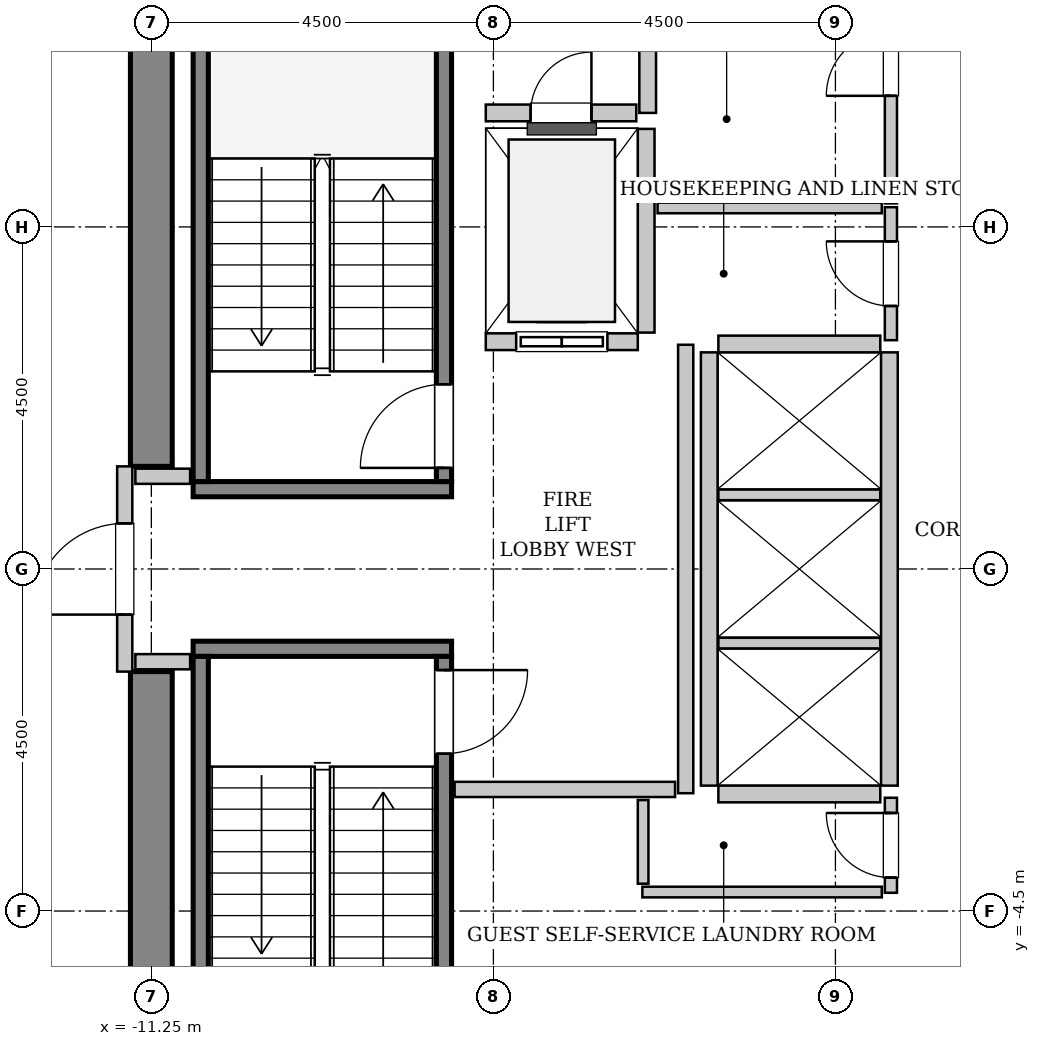
"""IFC4 building model, lengths in metres.
Left out: names, types, materials, properties, quantities, classifications, styles, units other than length and angle.
Written with IfcOpenShell. Run it as: python <this file> out.ifc"""

import sys

from ifc_helpers import new_model, si_unit, direction, frame, frame_2d, origin, place, context, subcontext, project, spatial, rectangle, extrude, source, transform, mapped, element, fill, save


model = new_model("IFC4")
c1 = context("Model", 3, precision=1e-05, world=origin(), true_north=direction((0.0, 1.0)))
c2 = subcontext(c1, "Body", "Model", "MODEL_VIEW")
j1 = project(units=[si_unit("LENGTHUNIT", "METRE"), si_unit("PLANEANGLEUNIT", "RADIAN")], contexts=[c1])
p1 = place(None, origin())
s1 = spatial("IfcSite", under=j1, at=p1, CompositionType="ELEMENT")
p2 = place(p1, origin())
s2 = spatial("IfcBuilding", under=s1, at=p2, CompositionType="ELEMENT")
p3 = place(p2, frame((0.0, 0.0, 198.2)))
s3 = spatial("IfcBuildingStorey", under=s2, at=p3, CompositionType="ELEMENT", Elevation=198.2)
m1 = source(origin(), c2, "Body", "SweptSolid", [
    extrude(rectangle(XDim=7.375, YDim=0.55, at=frame_2d((3.688, 0.0))), origin(), (0.0, 0.0, 1.0), 3.8),
])
for number, where, z_axis, x_axis in (
    (1, (-11.25, -8.725, 0.0), (0.0, 0.0, 1.0), (0.0, 1.0, 0.0)),
    (2, (-11.25, 1.35, 0.0), (0.0, 0.0, 1.0), (0.0, 1.0, 0.0)),
):
    element("IfcWall", number, at=place(p3, frame(where, z_axis=z_axis, x_axis=x_axis)), inside=s3, PredefinedType="SHEAR", context=c2, shape_type="MappedRepresentation", body=[
        mapped(m1, transform((0.0, 0.0, 0.0), x_axis=(1.0, 0.0, 0.0), y_axis=(0.0, 1.0, 0.0), z_axis=(0.0, 0.0, 1.0), scale=1.0)),
    ])
m2 = source(origin(), c2, "Body", "SweptSolid", [
    extrude(rectangle(XDim=3.4, YDim=0.2, at=frame_2d((1.7, 0.0))), origin(), (0.0, 0.0, 1.0), 3.8),
])
p4 = place(p3, frame((-7.3, 1.05, 0.0), z_axis=(0.0, 0.0, 1.0), x_axis=(-1.0, 0.0, 0.0)))
e3 = element("IfcWall", 3, at=p4, inside=s3, PredefinedType="SOLIDWALL", context=c2, shape_type="MappedRepresentation", body=[
    mapped(m2, transform((0.0, 0.0, 0.0), x_axis=(1.0, 0.0, 0.0), y_axis=(0.0, 1.0, 0.0), z_axis=(0.0, 0.0, 1.0), scale=1.0)),
])
m3 = source(origin(), c2, "Body", "SweptSolid", [
    extrude(rectangle(XDim=7.1, YDim=0.2, at=frame_2d((3.55, 0.0))), origin(), (0.0, 0.0, 1.0), 3.8),
])
p5 = place(p3, frame((-7.4, 1.15, 0.0), z_axis=(0.0, 0.0, 1.0), x_axis=(0.0, 1.0, 0.0)))
e4 = element("IfcWall", 4, at=p5, inside=s3, PredefinedType="SOLIDWALL", context=c2, shape_type="MappedRepresentation", body=[
    mapped(m3, transform((0.0, 0.0, 0.0), x_axis=(1.0, 0.0, 0.0), y_axis=(0.0, 1.0, 0.0), z_axis=(0.0, 0.0, 1.0), scale=1.0)),
])
p6 = place(p5, frame((0.18, 0.0, 0.0)))
e5 = element("IfcOpeningElement", 5, at=p6, cuts=e4, PredefinedType="OPENING", context=c2, shape_type="SweptSolid", body=[
    extrude(rectangle(XDim=1.1, YDim=2.15, at=frame_2d((0.55, 1.075))), frame((0.0, 0.11, 0.0), z_axis=(0.0, -1.0, 0.0), x_axis=(1.0, 0.0, 0.0)), (0.0, 0.0, 1.0), 0.22),
])
p7 = place(p3, frame((-10.6, 1.15, 0.0), z_axis=(0.0, 0.0, 1.0), x_axis=(0.0, 1.0, 0.0)))
e6 = element("IfcWall", 6, at=p7, inside=s3, PredefinedType="SOLIDWALL", context=c2, shape_type="MappedRepresentation", body=[
    mapped(m3, transform((0.0, 0.0, 0.0), x_axis=(1.0, 0.0, 0.0), y_axis=(0.0, 1.0, 0.0), z_axis=(0.0, 0.0, 1.0), scale=1.0)),
])
p8 = place(p3, frame((-10.7, -1.05, 0.0), z_axis=(0.0, 0.0, 1.0), x_axis=(1.0, 0.0, 0.0)))
e7 = element("IfcWall", 7, at=p8, inside=s3, PredefinedType="SOLIDWALL", context=c2, shape_type="MappedRepresentation", body=[
    mapped(m2, transform((0.0, 0.0, 0.0), x_axis=(1.0, 0.0, 0.0), y_axis=(0.0, 1.0, 0.0), z_axis=(0.0, 0.0, 1.0), scale=1.0)),
])
p9 = place(p3, frame((-10.6, -1.15, 0.0), z_axis=(0.0, 0.0, 1.0), x_axis=(0.0, -1.0, 0.0)))
e8 = element("IfcWall", 8, at=p9, inside=s3, PredefinedType="SOLIDWALL", context=c2, shape_type="MappedRepresentation", body=[
    mapped(m3, transform((0.0, 0.0, 0.0), x_axis=(1.0, 0.0, 0.0), y_axis=(0.0, 1.0, 0.0), z_axis=(0.0, 0.0, 1.0), scale=1.0)),
])
p10 = place(p3, frame((-7.4, -1.15, 0.0), z_axis=(0.0, 0.0, 1.0), x_axis=(0.0, -1.0, 0.0)))
e9 = element("IfcWall", 9, at=p10, inside=s3, PredefinedType="SOLIDWALL", context=c2, shape_type="MappedRepresentation", body=[
    mapped(m3, transform((0.0, 0.0, 0.0), x_axis=(1.0, 0.0, 0.0), y_axis=(0.0, 1.0, 0.0), z_axis=(0.0, 0.0, 1.0), scale=1.0)),
])
p11 = place(p10, frame((0.18, 0.0, 0.0)))
e10 = element("IfcOpeningElement", 10, at=p11, cuts=e9, PredefinedType="OPENING", context=c2, shape_type="SweptSolid", body=[
    extrude(rectangle(XDim=1.1, YDim=2.15, at=frame_2d((0.55, 1.075))), frame((0.0, 0.11, 0.0), z_axis=(0.0, -1.0, 0.0), x_axis=(1.0, 0.0, 0.0)), (0.0, 0.0, 1.0), 0.22),
])
m4 = source(origin(), c2, "Body", "SweptSolid", [
    extrude(rectangle(XDim=2.0, YDim=0.22, at=frame_2d((1.0, 0.0))), origin(), (0.0, 0.0, 1.0), 3.485),
])
p12 = place(p3, frame((-6.85, 2.99, 0.0), z_axis=(0.0, 0.0, 1.0), x_axis=(1.0, 0.0, 0.0)))
e11 = element("IfcWall", 11, at=p12, inside=s3, PredefinedType="SOLIDWALL", context=c2, shape_type="MappedRepresentation", body=[
    mapped(m4, transform((0.0, 0.0, 0.0), x_axis=(1.0, 0.0, 0.0), y_axis=(0.0, 1.0, 0.0), z_axis=(0.0, 0.0, 1.0), scale=1.0)),
])
p13 = place(p12, frame((0.4, 0.0, 0.0)))
e12 = element("IfcOpeningElement", 12, at=p13, cuts=e11, PredefinedType="OPENING", context=c2, shape_type="SweptSolid", body=[
    extrude(rectangle(XDim=1.2, YDim=2.2, at=frame_2d((0.6, 1.1))), frame((0.0, 0.12, 0.0), z_axis=(0.0, -1.0, 0.0), x_axis=(1.0, 0.0, 0.0)), (0.0, 0.0, 1.0), 0.24),
])
m5 = source(origin(), c2, "Body", "SweptSolid", [
    extrude(rectangle(XDim=2.68, YDim=0.22, at=frame_2d((1.34, 0.0))), origin(), (0.0, 0.0, 1.0), 3.485),
])
p14 = place(p3, frame((-4.74, 3.11, 0.0), z_axis=(0.0, 0.0, 1.0), x_axis=(0.0, 1.0, 0.0)))
e13 = element("IfcWall", 13, at=p14, inside=s3, PredefinedType="SOLIDWALL", context=c2, shape_type="MappedRepresentation", body=[
    mapped(m5, transform((0.0, 0.0, 0.0), x_axis=(1.0, 0.0, 0.0), y_axis=(0.0, 1.0, 0.0), z_axis=(0.0, 0.0, 1.0), scale=1.0)),
])
m6 = source(origin(), c2, "Body", "SweptSolid", [
    extrude(rectangle(XDim=5.7, YDim=0.22, at=frame_2d((2.85, 0.0))), origin(), (0.0, 0.0, 1.0), 3.485),
])
for number, where, z_axis, x_axis in (
    (14, (-1.54, -2.85, 0.0), (0.0, 0.0, 1.0), (0.0, 1.0, 0.0)),
    (15, (-3.91, 2.85, 0.0), (0.0, 0.0, 1.0), (0.0, -1.0, 0.0)),
):
    element("IfcWall", number, at=place(p3, frame(where, z_axis=z_axis, x_axis=x_axis)), inside=s3, PredefinedType="SOLIDWALL", context=c2, shape_type="MappedRepresentation", body=[
        mapped(m6, transform((0.0, 0.0, 0.0), x_axis=(1.0, 0.0, 0.0), y_axis=(0.0, 1.0, 0.0), z_axis=(0.0, 0.0, 1.0), scale=1.0)),
    ])
m7 = source(origin(), c2, "Body", "SweptSolid", [
    extrude(rectangle(XDim=2.13, YDim=0.22, at=frame_2d((1.065, 0.0))), origin(), (0.0, 0.0, 1.0), 3.485),
])
p15 = place(p3, frame((-3.79, -2.96, 0.0), z_axis=(0.0, 0.0, 1.0), x_axis=(1.0, 0.0, 0.0)))
e16 = element("IfcWall", 16, at=p15, inside=s3, PredefinedType="SOLIDWALL", context=c2, shape_type="MappedRepresentation", body=[
    mapped(m7, transform((0.0, 0.0, 0.0), x_axis=(1.0, 0.0, 0.0), y_axis=(0.0, 1.0, 0.0), z_axis=(0.0, 0.0, 1.0), scale=1.0)),
])
m8 = source(origin(), c2, "Body", "SweptSolid", [
    extrude(rectangle(XDim=2.13, YDim=0.14, at=frame_2d((1.065, 0.0))), origin(), (0.0, 0.0, 1.0), 3.485),
])
for number, where, z_axis, x_axis in (
    (17, (-3.79, -0.975, 0.0), (0.0, 0.0, 1.0), (1.0, 0.0, 0.0)),
    (18, (-3.79, 0.975, 0.0), (0.0, 0.0, 1.0), (1.0, 0.0, 0.0)),
):
    element("IfcWall", number, at=place(p3, frame(where, z_axis=z_axis, x_axis=x_axis)), inside=s3, PredefinedType="PARTITIONING", context=c2, shape_type="MappedRepresentation", body=[
        mapped(m8, transform((0.0, 0.0, 0.0), x_axis=(1.0, 0.0, 0.0), y_axis=(0.0, 1.0, 0.0), z_axis=(0.0, 0.0, 1.0), scale=1.0)),
    ])
p16 = place(p3, frame((-1.66, 2.96, 0.0), z_axis=(0.0, 0.0, 1.0), x_axis=(-1.0, 0.0, 0.0)))
e19 = element("IfcWall", 19, at=p16, inside=s3, PredefinedType="SOLIDWALL", context=c2, shape_type="MappedRepresentation", body=[
    mapped(m7, transform((0.0, 0.0, 0.0), x_axis=(1.0, 0.0, 0.0), y_axis=(0.0, 1.0, 0.0), z_axis=(0.0, 0.0, 1.0), scale=1.0)),
])
m9 = source(origin(), c2, "Body", "SweptSolid", [
    extrude(rectangle(XDim=2.25, YDim=0.22, at=frame_2d((1.125, 0.0))), origin(), (0.0, 0.0, 1.0), 3.485),
])
p17 = place(p3, frame((-4.72, 6.0, 0.0), z_axis=(0.0, 0.0, 1.0), x_axis=(0.0, 1.0, 0.0)))
e20 = element("IfcWall", 20, at=p17, inside=s3, PredefinedType="SOLIDWALL", context=c2, shape_type="MappedRepresentation", body=[
    mapped(m9, transform((0.0, 0.0, 0.0), x_axis=(1.0, 0.0, 0.0), y_axis=(0.0, 1.0, 0.0), z_axis=(0.0, 0.0, 1.0), scale=1.0)),
])
m10 = source(origin(), c2, "Body", "SweptSolid", [
    extrude(rectangle(XDim=1.98, YDim=0.22, at=frame_2d((0.99, 0.0))), origin(), (0.0, 0.0, 1.0), 3.485),
])
p18 = place(p3, frame((-6.85, 6.0, 0.0), z_axis=(0.0, 0.0, 1.0), x_axis=(1.0, 0.0, 0.0)))
e21 = element("IfcWall", 21, at=p18, inside=s3, PredefinedType="SOLIDWALL", context=c2, shape_type="MappedRepresentation", body=[
    mapped(m10, transform((0.0, 0.0, 0.0), x_axis=(1.0, 0.0, 0.0), y_axis=(0.0, 1.0, 0.0), z_axis=(0.0, 0.0, 1.0), scale=1.0)),
])
p19 = place(p18, frame((0.59, 0.0, 0.0)))
e22 = element("IfcOpeningElement", 22, at=p19, cuts=e21, PredefinedType="OPENING", context=c2, shape_type="SweptSolid", body=[
    extrude(rectangle(XDim=0.8, YDim=2.0, at=frame_2d((0.4, 1.0))), frame((0.0, 0.12, 0.0), z_axis=(0.0, -1.0, 0.0), x_axis=(1.0, 0.0, 0.0)), (0.0, 0.0, 1.0), 0.24),
])
m11 = source(origin(), c2, "Body", "SweptSolid", [
    extrude(rectangle(XDim=2.7, YDim=0.2, at=frame_2d((1.35, 0.0))), origin(), (0.0, 0.0, 1.0), 2.375),
])
p20 = place(p3, frame((-11.6, -1.35, 0.0), z_axis=(0.0, 0.0, 1.0), x_axis=(0.0, 1.0, 0.0)))
e23 = element("IfcWall", 23, at=p20, inside=s3, PredefinedType="PARTITIONING", context=c2, shape_type="MappedRepresentation", body=[
    mapped(m11, transform((0.0, 0.0, 0.0), x_axis=(1.0, 0.0, 0.0), y_axis=(0.0, 1.0, 0.0), z_axis=(0.0, 0.0, 1.0), scale=1.0)),
])
p21 = place(p20, frame((0.75, 0.0, 0.0)))
e24 = element("IfcOpeningElement", 24, at=p21, cuts=e23, PredefinedType="OPENING", context=c2, shape_type="SweptSolid", body=[
    extrude(rectangle(XDim=1.2, YDim=2.15, at=frame_2d((0.6, 1.075))), frame((0.0, 0.11, 0.0), z_axis=(0.0, -1.0, 0.0), x_axis=(1.0, 0.0, 0.0)), (0.0, 0.0, 1.0), 0.22),
])
m12 = source(origin(), c2, "Body", "SweptSolid", [
    extrude(rectangle(XDim=5.9, YDim=0.2, at=frame_2d((2.95, 0.0))), origin(), (0.0, 0.0, 1.0), 3.485),
])
p22 = place(p3, frame((-4.22, -2.95, 0.0), z_axis=(0.0, 0.0, 1.0), x_axis=(0.0, 1.0, 0.0)))
e25 = element("IfcWall", 25, at=p22, inside=s3, PredefinedType="PARTITIONING", context=c2, shape_type="MappedRepresentation", body=[
    mapped(m12, transform((0.0, 0.0, 0.0), x_axis=(1.0, 0.0, 0.0), y_axis=(0.0, 1.0, 0.0), z_axis=(0.0, 0.0, 1.0), scale=1.0)),
])
m13 = source(origin(), c2, "Body", "SweptSolid", [
    extrude(rectangle(XDim=2.9, YDim=0.2, at=frame_2d((1.45, 0.0))), origin(), (0.0, 0.0, 1.0), 3.485),
])
p23 = place(p3, frame((-7.26, -2.9, 0.0), z_axis=(0.0, 0.0, 1.0), x_axis=(1.0, 0.0, 0.0)))
e26 = element("IfcWall", 26, at=p23, inside=s3, PredefinedType="PARTITIONING", context=c2, shape_type="MappedRepresentation", body=[
    mapped(m13, transform((0.0, 0.0, 0.0), x_axis=(1.0, 0.0, 0.0), y_axis=(0.0, 1.0, 0.0), z_axis=(0.0, 0.0, 1.0), scale=1.0)),
])
m14 = source(origin(), c2, "Body", "SweptSolid", [
    extrude(rectangle(XDim=0.72, YDim=0.2, at=frame_2d((0.36, 0.0))), origin(), (0.0, 0.0, 1.0), 3.485),
])
for number, where, z_axis, x_axis in (
    (27, (-11.46, 1.22, 0.0), (0.0, 0.0, 1.0), (1.0, 0.0, 0.0)),
    (28, (-11.46, -1.22, 0.0), (0.0, 0.0, 1.0), (1.0, 0.0, 0.0)),
):
    element("IfcWall", number, at=place(p3, frame(where, z_axis=z_axis, x_axis=x_axis)), inside=s3, PredefinedType="PARTITIONING", context=c2, shape_type="MappedRepresentation", body=[
        mapped(m14, transform((0.0, 0.0, 0.0), x_axis=(1.0, 0.0, 0.0), y_axis=(0.0, 1.0, 0.0), z_axis=(0.0, 0.0, 1.0), scale=1.0)),
    ])
m15 = source(origin(), c2, "Body", "SweptSolid", [
    extrude(rectangle(XDim=1.75, YDim=0.16, at=frame_2d((0.875, 0.0))), origin(), (0.0, 0.0, 1.0), 3.485),
])
p24 = place(p3, frame((-1.52, 3.01, 0.0), z_axis=(0.0, 0.0, 1.0), x_axis=(0.0, 1.0, 0.0)))
e29 = element("IfcWall", 29, at=p24, inside=s3, PredefinedType="PARTITIONING", context=c2, shape_type="MappedRepresentation", body=[
    mapped(m15, transform((0.0, 0.0, 0.0), x_axis=(1.0, 0.0, 0.0), y_axis=(0.0, 1.0, 0.0), z_axis=(0.0, 0.0, 1.0), scale=1.0)),
])
p25 = place(p24, frame((0.45, 0.0, 0.0)))
e30 = element("IfcOpeningElement", 30, at=p25, cuts=e29, PredefinedType="OPENING", context=c2, shape_type="SweptSolid", body=[
    extrude(rectangle(XDim=0.85, YDim=2.1, at=frame_2d((0.425, 1.05))), frame((0.0, 0.09, 0.0), z_axis=(0.0, -1.0, 0.0), x_axis=(1.0, 0.0, 0.0)), (0.0, 0.0, 1.0), 0.18),
])
m16 = source(origin(), c2, "Body", "SweptSolid", [
    extrude(rectangle(XDim=2.95, YDim=0.14, at=frame_2d((1.475, 0.0))), origin(), (0.0, 0.0, 1.0), 3.485),
])
p26 = place(p3, frame((-4.59, 4.75, 0.0), z_axis=(0.0, 0.0, 1.0), x_axis=(1.0, 0.0, 0.0)))
e31 = element("IfcWall", 31, at=p26, inside=s3, PredefinedType="PARTITIONING", context=c2, shape_type="MappedRepresentation", body=[
    mapped(m16, transform((0.0, 0.0, 0.0), x_axis=(1.0, 0.0, 0.0), y_axis=(0.0, 1.0, 0.0), z_axis=(0.0, 0.0, 1.0), scale=1.0)),
])
m17 = source(origin(), c2, "Body", "SweptSolid", [
    extrude(rectangle(XDim=3.68, YDim=0.16, at=frame_2d((1.84, 0.0))), origin(), (0.0, 0.0, 1.0), 3.485),
])
p27 = place(p3, frame((-1.52, 4.81, 0.0), z_axis=(0.0, 0.0, 1.0), x_axis=(0.0, 1.0, 0.0)))
e32 = element("IfcWall", 32, at=p27, inside=s3, PredefinedType="PARTITIONING", context=c2, shape_type="MappedRepresentation", body=[
    mapped(m17, transform((0.0, 0.0, 0.0), x_axis=(1.0, 0.0, 0.0), y_axis=(0.0, 1.0, 0.0), z_axis=(0.0, 0.0, 1.0), scale=1.0)),
])
p28 = place(p27, frame((1.415, 0.0, 0.0)))
e33 = element("IfcOpeningElement", 33, at=p28, cuts=e32, PredefinedType="OPENING", context=c2, shape_type="SweptSolid", body=[
    extrude(rectangle(XDim=0.85, YDim=2.1, at=frame_2d((0.425, 1.05))), frame((0.0, 0.09, 0.0), z_axis=(0.0, -1.0, 0.0), x_axis=(1.0, 0.0, 0.0)), (0.0, 0.0, 1.0), 0.18),
])
m18 = source(origin(), c2, "Body", "SweptSolid", [
    extrude(rectangle(XDim=1.25, YDim=0.16, at=frame_2d((0.625, 0.0))), origin(), (0.0, 0.0, 1.0), 3.485),
])
p29 = place(p3, frame((-1.52, -4.26, 0.0), z_axis=(0.0, 0.0, 1.0), x_axis=(0.0, 1.0, 0.0)))
e34 = element("IfcWall", 34, at=p29, inside=s3, PredefinedType="PARTITIONING", context=c2, shape_type="MappedRepresentation", body=[
    mapped(m18, transform((0.0, 0.0, 0.0), x_axis=(1.0, 0.0, 0.0), y_axis=(0.0, 1.0, 0.0), z_axis=(0.0, 0.0, 1.0), scale=1.0)),
])
p30 = place(p29, frame((0.2, 0.0, 0.0)))
e35 = element("IfcOpeningElement", 35, at=p30, cuts=e34, PredefinedType="OPENING", context=c2, shape_type="SweptSolid", body=[
    extrude(rectangle(XDim=0.85, YDim=2.1, at=frame_2d((0.425, 1.05))), frame((0.0, 0.09, 0.0), z_axis=(0.0, -1.0, 0.0), x_axis=(1.0, 0.0, 0.0)), (0.0, 0.0, 1.0), 0.18),
])
m19 = source(origin(), c2, "Body", "SweptSolid", [
    extrude(rectangle(XDim=3.15, YDim=0.14, at=frame_2d((1.575, 0.0))), origin(), (0.0, 0.0, 1.0), 3.485),
])
p31 = place(p3, frame((-4.79, -4.25, 0.0), z_axis=(0.0, 0.0, 1.0), x_axis=(1.0, 0.0, 0.0)))
e36 = element("IfcWall", 36, at=p31, inside=s3, PredefinedType="PARTITIONING", context=c2, shape_type="MappedRepresentation", body=[
    mapped(m19, transform((0.0, 0.0, 0.0), x_axis=(1.0, 0.0, 0.0), y_axis=(0.0, 1.0, 0.0), z_axis=(0.0, 0.0, 1.0), scale=1.0)),
])
m20 = source(origin(), c2, "Body", "SweptSolid", [
    extrude(rectangle(XDim=1.1, YDim=0.14, at=frame_2d((0.55, 0.0))), origin(), (0.0, 0.0, 1.0), 3.485),
])
p32 = place(p3, frame((-4.78, -4.14, 0.0), z_axis=(0.0, 0.0, 1.0), x_axis=(0.0, 1.0, 0.0)))
e37 = element("IfcWall", 37, at=p32, inside=s3, PredefinedType="PARTITIONING", context=c2, shape_type="MappedRepresentation", body=[
    mapped(m20, transform((0.0, 0.0, 0.0), x_axis=(1.0, 0.0, 0.0), y_axis=(0.0, 1.0, 0.0), z_axis=(0.0, 0.0, 1.0), scale=1.0)),
])
m21 = source(origin(), c2, "Body", "SweptSolid", [
    extrude(rectangle(XDim=1.1, YDim=2.15, at=frame_2d((0.55, 1.075))), frame((0.0, 0.025, 0.0), z_axis=(0.0, -1.0, 0.0), x_axis=(1.0, 0.0, 0.0)), (0.0, 0.0, 1.0), 0.05),
])
p33 = place(p6, origin())
e38 = element("IfcDoor", 38, at=p33, inside=s3, OperationType="SINGLE_SWING_LEFT", PredefinedType="DOOR", context=c2, shape_type="MappedRepresentation", body=[
    mapped(m21, transform((0.0, 0.0, 0.0), x_axis=(1.0, 0.0, 0.0), y_axis=(0.0, 1.0, 0.0), z_axis=(0.0, 0.0, 1.0), scale=1.0)),
])
fill(e5, e38)
p34 = place(p11, origin())
e39 = element("IfcDoor", 39, at=p34, inside=s3, OperationType="SINGLE_SWING_LEFT", PredefinedType="DOOR", context=c2, shape_type="MappedRepresentation", body=[
    mapped(m21, transform((0.0, 0.0, 0.0), x_axis=(1.0, 0.0, 0.0), y_axis=(0.0, 1.0, 0.0), z_axis=(0.0, 0.0, 1.0), scale=1.0)),
])
fill(e10, e39)
m22 = source(origin(), c2, "Body", "SweptSolid", [
    extrude(rectangle(XDim=1.2, YDim=2.2, at=frame_2d((0.6, 1.1))), frame((0.0, 0.025, 0.0), z_axis=(0.0, -1.0, 0.0), x_axis=(1.0, 0.0, 0.0)), (0.0, 0.0, 1.0), 0.05),
])
p35 = place(p13, origin())
e40 = element("IfcDoor", 40, at=p35, inside=s3, OperationType="SLIDING_TO_LEFT", PredefinedType="DOOR", context=c2, shape_type="MappedRepresentation", body=[
    mapped(m22, transform((0.0, 0.0, 0.0), x_axis=(1.0, 0.0, 0.0), y_axis=(0.0, 1.0, 0.0), z_axis=(0.0, 0.0, 1.0), scale=1.0)),
])
fill(e12, e40)
m23 = source(origin(), c2, "Body", "SweptSolid", [
    extrude(rectangle(XDim=0.8, YDim=2.0, at=frame_2d((0.4, 1.0))), frame((0.0, 0.025, 0.0), z_axis=(0.0, -1.0, 0.0), x_axis=(1.0, 0.0, 0.0)), (0.0, 0.0, 1.0), 0.05),
])
p36 = place(p19, origin())
e41 = element("IfcDoor", 41, at=p36, inside=s3, OperationType="SINGLE_SWING_RIGHT", PredefinedType="TRAPDOOR", context=c2, shape_type="MappedRepresentation", body=[
    mapped(m23, transform((0.0, 0.0, 0.0), x_axis=(1.0, 0.0, 0.0), y_axis=(0.0, 1.0, 0.0), z_axis=(0.0, 0.0, 1.0), scale=1.0)),
])
fill(e22, e41)
m24 = source(origin(), c2, "Body", "SweptSolid", [
    extrude(rectangle(XDim=1.2, YDim=2.15, at=frame_2d((0.6, 1.075))), frame((0.0, 0.025, 0.0), z_axis=(0.0, -1.0, 0.0), x_axis=(1.0, 0.0, 0.0)), (0.0, 0.0, 1.0), 0.05),
])
p37 = place(p21, origin())
e42 = element("IfcDoor", 42, at=p37, inside=s3, OperationType="SINGLE_SWING_LEFT", PredefinedType="DOOR", context=c2, shape_type="MappedRepresentation", body=[
    mapped(m24, transform((0.0, 0.0, 0.0), x_axis=(1.0, 0.0, 0.0), y_axis=(0.0, 1.0, 0.0), z_axis=(0.0, 0.0, 1.0), scale=1.0)),
])
fill(e24, e42)
m25 = source(origin(), c2, "Body", "SweptSolid", [
    extrude(rectangle(XDim=0.85, YDim=2.1, at=frame_2d((0.425, 1.05))), frame((0.0, 0.025, 0.0), z_axis=(0.0, -1.0, 0.0), x_axis=(1.0, 0.0, 0.0)), (0.0, 0.0, 1.0), 0.05),
])
p38 = place(p25, origin())
e43 = element("IfcDoor", 43, at=p38, inside=s3, OperationType="SINGLE_SWING_RIGHT", PredefinedType="DOOR", context=c2, shape_type="MappedRepresentation", body=[
    mapped(m25, transform((0.0, 0.0, 0.0), x_axis=(1.0, 0.0, 0.0), y_axis=(0.0, 1.0, 0.0), z_axis=(0.0, 0.0, 1.0), scale=1.0)),
])
fill(e30, e43)
p39 = place(p28, origin())
e44 = element("IfcDoor", 44, at=p39, inside=s3, OperationType="SINGLE_SWING_LEFT", PredefinedType="DOOR", context=c2, shape_type="MappedRepresentation", body=[
    mapped(m25, transform((0.0, 0.0, 0.0), x_axis=(1.0, 0.0, 0.0), y_axis=(0.0, 1.0, 0.0), z_axis=(0.0, 0.0, 1.0), scale=1.0)),
])
fill(e33, e44)
p40 = place(p30, origin())
e45 = element("IfcDoor", 45, at=p40, inside=s3, OperationType="SINGLE_SWING_RIGHT", PredefinedType="DOOR", context=c2, shape_type="MappedRepresentation", body=[
    mapped(m25, transform((0.0, 0.0, 0.0), x_axis=(1.0, 0.0, 0.0), y_axis=(0.0, 1.0, 0.0), z_axis=(0.0, 0.0, 1.0), scale=1.0)),
])
fill(e35, e45)
save(model, sys.argv[1])
